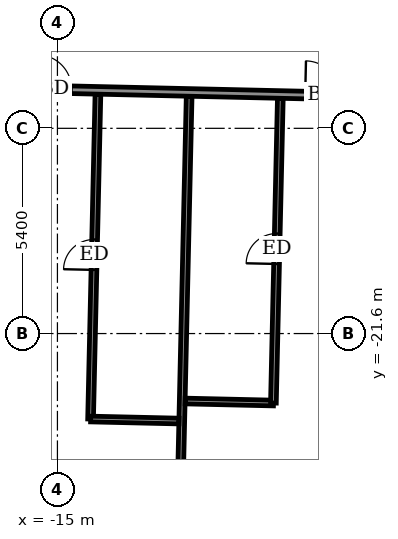
"""IFC4 building model, lengths in metres.
Left out: names, types, materials, properties, quantities, classifications, styles, units other than length and angle.
Written with IfcOpenShell. Run it as: python <this file> out.ifc"""

import sys

from ifc_helpers import new_model, si_unit, direction, frame, frame_2d, origin, place, context, subcontext, project, spatial, rectangle, extrude, element, fill, save


model = new_model("IFC4")
c1 = context("Model", 3, precision=1e-05, world=origin(), true_north=direction((0.0, 1.0)))
c2 = subcontext(c1, "Body", "Model", "MODEL_VIEW")
j1 = project(units=[si_unit("LENGTHUNIT", "METRE"), si_unit("PLANEANGLEUNIT", "RADIAN")], contexts=[c1])
p1 = place(None, origin())
s1 = spatial("IfcSite", under=j1, at=p1, CompositionType="ELEMENT")
p2 = place(p1, origin())
s2 = spatial("IfcBuilding", under=s1, at=p2, CompositionType="ELEMENT")
p3 = place(p2, frame((0.0, 0.0, 67.5)))
s3 = spatial("IfcBuildingStorey", under=s2, at=p3, CompositionType="ELEMENT", Elevation=67.5)
p4 = place(p3, frame((-11.809, -27.453, 0.0), z_axis=(0.0, 0.0, 1.0), x_axis=(0.02273928012, 0.99974142914, 0.0)))
e1 = element("IfcWall", 1, at=p4, inside=s3, PredefinedType="PARTITIONING", context=c2, shape_type="SweptSolid", body=[
    extrude(rectangle(XDim=12.1, YDim=0.15, at=frame_2d((6.05, 0.0))), origin(), (0.0, 0.0, 1.0), 2.55),
])
p5 = place(p3, frame((-14.128, -23.849, 0.0), z_axis=(0.0, 0.0, 1.0), x_axis=(0.022671462533, 0.999742969361, 0.0)))
e2 = element("IfcWall", 2, at=p5, inside=s3, PredefinedType="PARTITIONING", context=c2, shape_type="SweptSolid", body=[
    extrude(rectangle(XDim=8.55, YDim=0.15, at=frame_2d((4.275, 0.0))), origin(), (0.0, 0.0, 1.0), 3.05),
])
p6 = place(p5, frame((3.925, 0.0, 0.0)))
e3 = element("IfcOpeningElement", 3, at=p6, cuts=e2, PredefinedType="OPENING", context=c2, shape_type="SweptSolid", body=[
    extrude(rectangle(XDim=0.8, YDim=2.1, at=frame_2d((0.4, 1.05))), frame((0.0, 0.085, 0.0), z_axis=(0.0, -1.0, 0.0), x_axis=(1.0, 0.0, 0.0)), (0.0, 0.0, 1.0), 0.17),
])
p7 = place(p3, frame((-14.126, -23.849, 0.0), z_axis=(0.0, 0.0, 1.0), x_axis=(0.999740478815, -0.022781023197, 0.0)))
e4 = element("IfcWall", 4, at=p7, inside=s3, PredefinedType="PARTITIONING", context=c2, shape_type="SweptSolid", body=[
    extrude(rectangle(XDim=2.325, YDim=0.15, at=frame_2d((1.163, 0.0))), origin(), (0.0, 0.0, 1.0), 3.05),
])
p8 = place(p3, frame((-11.639, -23.375, 0.0), z_axis=(0.0, 0.0, 1.0), x_axis=(0.999740260747, -0.02279059109, 0.0)))
e5 = element("IfcWall", 5, at=p8, inside=s3, PredefinedType="PARTITIONING", context=c2, shape_type="SweptSolid", body=[
    extrude(rectangle(XDim=2.324, YDim=0.15, at=frame_2d((1.162, 0.0))), origin(), (0.0, 0.0, 1.0), 3.05),
])
p9 = place(p3, frame((-9.317, -23.428, 0.0), z_axis=(0.0, 0.0, 1.0), x_axis=(0.022678533363, 0.999742808989, 0.0)))
e6 = element("IfcWall", 6, at=p9, inside=s3, PredefinedType="PARTITIONING", context=c2, shape_type="SweptSolid", body=[
    extrude(rectangle(XDim=8.02, YDim=0.15, at=frame_2d((4.01, 0.0))), origin(), (0.0, 0.0, 1.0), 3.05),
])
p10 = place(p9, frame((3.66, 0.0, 0.0)))
e7 = element("IfcOpeningElement", 7, at=p10, cuts=e6, PredefinedType="OPENING", context=c2, shape_type="SweptSolid", body=[
    extrude(rectangle(XDim=0.8, YDim=2.1, at=frame_2d((0.4, 1.05))), frame((0.0, 0.085, 0.0), z_axis=(0.0, -1.0, 0.0), x_axis=(1.0, 0.0, 0.0)), (0.0, 0.0, 1.0), 0.17),
])
p11 = place(p3, frame((-26.151, -14.924, 0.0), z_axis=(0.0, 0.0, 1.0), x_axis=(0.999742750999, -0.022681089575, 0.0)))
e8 = element("IfcWall", 8, at=p11, inside=s3, PredefinedType="PARTITIONING", context=c2, shape_type="SweptSolid", body=[
    extrude(rectangle(XDim=54.886, YDim=0.2, at=frame_2d((27.443, 0.0))), origin(), (0.0, 0.0, 1.0), 3.05),
])
p12 = place(p11, frame((1.345, 0.0, 0.0)))
e9 = element("IfcOpeningElement", 9, at=p12, cuts=e8, PredefinedType="OPENING", context=c2, shape_type="SweptSolid", body=[
    extrude(rectangle(XDim=1.0, YDim=2.1, at=frame_2d((0.5, 1.05))), frame((0.0, 0.11, 0.0), z_axis=(0.0, -1.0, 0.0), x_axis=(1.0, 0.0, 0.0)), (0.0, 0.0, 1.0), 0.22),
])
p13 = place(p11, frame((8.35, 0.0, 0.0)))
e10 = element("IfcOpeningElement", 10, at=p13, cuts=e8, PredefinedType="OPENING", context=c2, shape_type="SweptSolid", body=[
    extrude(rectangle(XDim=0.9, YDim=2.1, at=frame_2d((0.45, 1.05))), frame((0.0, 0.11, 0.0), z_axis=(0.0, -1.0, 0.0), x_axis=(1.0, 0.0, 0.0)), (0.0, 0.0, 1.0), 0.22),
])
p14 = place(p11, frame((10.625, 0.0, 0.0)))
e11 = element("IfcOpeningElement", 11, at=p14, cuts=e8, PredefinedType="OPENING", context=c2, shape_type="SweptSolid", body=[
    extrude(rectangle(XDim=0.9, YDim=2.1, at=frame_2d((0.45, 1.05))), frame((0.0, 0.11, 0.0), z_axis=(0.0, -1.0, 0.0), x_axis=(1.0, 0.0, 0.0)), (0.0, 0.0, 1.0), 0.22),
])
p15 = place(p11, frame((17.675, 0.0, 0.0)))
e12 = element("IfcOpeningElement", 12, at=p15, cuts=e8, PredefinedType="OPENING", context=c2, shape_type="SweptSolid", body=[
    extrude(rectangle(XDim=0.9, YDim=2.1, at=frame_2d((0.45, 1.05))), frame((0.0, 0.11, 0.0), z_axis=(0.0, -1.0, 0.0), x_axis=(1.0, 0.0, 0.0)), (0.0, 0.0, 1.0), 0.22),
])
p16 = place(p11, frame((19.725, 0.0, 0.0)))
e13 = element("IfcOpeningElement", 13, at=p16, cuts=e8, PredefinedType="OPENING", context=c2, shape_type="SweptSolid", body=[
    extrude(rectangle(XDim=0.9, YDim=2.1, at=frame_2d((0.45, 1.05))), frame((0.0, 0.11, 0.0), z_axis=(0.0, -1.0, 0.0), x_axis=(1.0, 0.0, 0.0)), (0.0, 0.0, 1.0), 0.22),
])
p17 = place(p11, frame((26.575, 0.0, 0.0)))
e14 = element("IfcOpeningElement", 14, at=p17, cuts=e8, PredefinedType="OPENING", context=c2, shape_type="SweptSolid", body=[
    extrude(rectangle(XDim=0.9, YDim=2.1, at=frame_2d((0.45, 1.05))), frame((0.0, 0.11, 0.0), z_axis=(0.0, -1.0, 0.0), x_axis=(1.0, 0.0, 0.0)), (0.0, 0.0, 1.0), 0.22),
])
p18 = place(p11, frame((28.75, 0.0, 0.0)))
e15 = element("IfcOpeningElement", 15, at=p18, cuts=e8, PredefinedType="OPENING", context=c2, shape_type="SweptSolid", body=[
    extrude(rectangle(XDim=0.9, YDim=2.1, at=frame_2d((0.45, 1.05))), frame((0.0, 0.11, 0.0), z_axis=(0.0, -1.0, 0.0), x_axis=(1.0, 0.0, 0.0)), (0.0, 0.0, 1.0), 0.22),
])
p19 = place(p11, frame((35.875, 0.0, 0.0)))
e16 = element("IfcOpeningElement", 16, at=p19, cuts=e8, PredefinedType="OPENING", context=c2, shape_type="SweptSolid", body=[
    extrude(rectangle(XDim=0.9, YDim=2.1, at=frame_2d((0.45, 1.05))), frame((0.0, 0.11, 0.0), z_axis=(0.0, -1.0, 0.0), x_axis=(1.0, 0.0, 0.0)), (0.0, 0.0, 1.0), 0.22),
])
p20 = place(p11, frame((38.1, 0.0, 0.0)))
e17 = element("IfcOpeningElement", 17, at=p20, cuts=e8, PredefinedType="OPENING", context=c2, shape_type="SweptSolid", body=[
    extrude(rectangle(XDim=0.9, YDim=2.1, at=frame_2d((0.45, 1.05))), frame((0.0, 0.11, 0.0), z_axis=(0.0, -1.0, 0.0), x_axis=(1.0, 0.0, 0.0)), (0.0, 0.0, 1.0), 0.22),
])
p21 = place(p11, frame((45.125, 0.0, 0.0)))
e18 = element("IfcOpeningElement", 18, at=p21, cuts=e8, PredefinedType="OPENING", context=c2, shape_type="SweptSolid", body=[
    extrude(rectangle(XDim=0.9, YDim=2.1, at=frame_2d((0.45, 1.05))), frame((0.0, 0.11, 0.0), z_axis=(0.0, -1.0, 0.0), x_axis=(1.0, 0.0, 0.0)), (0.0, 0.0, 1.0), 0.22),
])
p22 = place(p11, frame((52.618, 0.0, 0.0)))
e19 = element("IfcOpeningElement", 19, at=p22, cuts=e8, PredefinedType="OPENING", context=c2, shape_type="SweptSolid", body=[
    extrude(rectangle(XDim=1.0, YDim=2.1, at=frame_2d((0.5, 1.05))), frame((0.0, 0.11, 0.0), z_axis=(0.0, -1.0, 0.0), x_axis=(1.0, 0.0, 0.0)), (0.0, 0.0, 1.0), 0.22),
])
p23 = place(p11, frame((47.575, 0.0, 0.0)))
e20 = element("IfcOpeningElement", 20, at=p23, cuts=e8, PredefinedType="OPENING", context=c2, shape_type="SweptSolid", body=[
    extrude(rectangle(XDim=0.9, YDim=2.1, at=frame_2d((0.45, 1.05))), frame((0.0, 0.11, 0.0), z_axis=(0.0, -1.0, 0.0), x_axis=(1.0, 0.0, 0.0)), (0.0, 0.0, 1.0), 0.22),
])
p24 = place(p14, origin())
e21 = element("IfcDoor", 21, at=p24, inside=s3, OperationType="SINGLE_SWING_RIGHT", PredefinedType="DOOR", context=c2, shape_type="SweptSolid", body=[
    extrude(rectangle(XDim=0.9, YDim=2.1, at=frame_2d((0.45, 1.05))), frame((0.0, 0.025, 0.0), z_axis=(0.0, -1.0, 0.0), x_axis=(1.0, 0.0, 0.0)), (0.0, 0.0, 1.0), 0.05),
])
fill(e11, e21)
p25 = place(p6, origin())
e22 = element("IfcDoor", 22, at=p25, inside=s3, OperationType="SINGLE_SWING_RIGHT", PredefinedType="DOOR", context=c2, shape_type="SweptSolid", body=[
    extrude(rectangle(XDim=0.8, YDim=2.1, at=frame_2d((0.4, 1.05))), frame((0.0, 0.025, 0.0), z_axis=(0.0, -1.0, 0.0), x_axis=(1.0, 0.0, 0.0)), (0.0, 0.0, 1.0), 0.05),
])
fill(e3, e22)
p26 = place(p15, origin())
e23 = element("IfcDoor", 23, at=p26, inside=s3, OperationType="SINGLE_SWING_LEFT", PredefinedType="DOOR", context=c2, shape_type="SweptSolid", body=[
    extrude(rectangle(XDim=0.9, YDim=2.1, at=frame_2d((0.45, 1.05))), frame((0.0, 0.025, 0.0), z_axis=(0.0, -1.0, 0.0), x_axis=(1.0, 0.0, 0.0)), (0.0, 0.0, 1.0), 0.05),
])
fill(e12, e23)
p27 = place(p10, origin())
e24 = element("IfcDoor", 24, at=p27, inside=s3, OperationType="SINGLE_SWING_LEFT", PredefinedType="DOOR", context=c2, shape_type="SweptSolid", body=[
    extrude(rectangle(XDim=0.8, YDim=2.1, at=frame_2d((0.4, 1.05))), frame((0.0, 0.025, 0.0), z_axis=(0.0, -1.0, 0.0), x_axis=(1.0, 0.0, 0.0)), (0.0, 0.0, 1.0), 0.05),
])
fill(e7, e24)
save(model, sys.argv[1])
